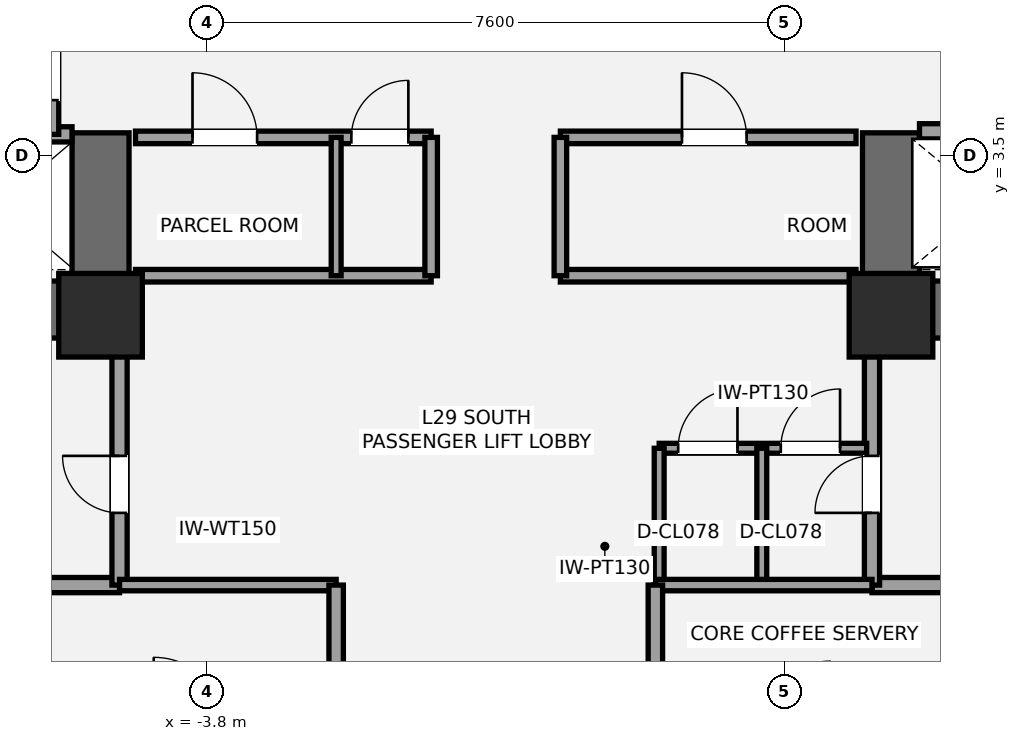
"""IFC4 building model, lengths in metres.
Left out: names, types, materials, properties, quantities, classifications, styles, units other than length and angle.
Written with IfcOpenShell. Run it as: python <this file> out.ifc"""

import sys

from ifc_helpers import new_model, si_unit, direction, frame, frame_2d, origin, origin_2d, place, context, subcontext, project, spatial, rectangle, extrude, element, fill, save


model = new_model("IFC4")
c1 = context("Model", 3, precision=1e-05, world=origin(), true_north=direction((0.0, 1.0)))
c2 = subcontext(c1, "Body", "Model", "MODEL_VIEW")
j1 = project(units=[si_unit("LENGTHUNIT", "METRE"), si_unit("PLANEANGLEUNIT", "RADIAN")], contexts=[c1])
p1 = place(None, origin())
s1 = spatial("IfcSite", under=j1, at=p1, CompositionType="ELEMENT")
p2 = place(p1, origin())
s2 = spatial("IfcBuilding", under=s1, at=p2, CompositionType="ELEMENT")
p3 = place(p2, frame((0.0, 0.0, 110.6)))
s3 = spatial("IfcBuildingStorey", under=s2, at=p3, CompositionType="ELEMENT", Elevation=110.6)
p4 = place(p3, frame((-4.825, 1.475, 0.0), z_axis=(0.0, 0.0, 1.0), x_axis=(-1.0, 0.0, 0.0)))
e1 = element("IfcWall", 1, at=p4, inside=s3, PredefinedType="SHEAR", context=c2, shape_type="SweptSolid", body=[
    extrude(rectangle(XDim=9.075, YDim=0.75, at=frame_2d((4.538, 0.0))), origin(), (0.0, 0.0, 1.0), 3.5),
])
p5 = place(p4, frame((5.475, 0.0, 0.0)))
e2 = element("IfcOpeningElement", 2, at=p5, cuts=e1, PredefinedType="OPENING", context=c2, shape_type="SweptSolid", body=[
    extrude(rectangle(XDim=1.05, YDim=2.15, at=frame_2d((0.525, 1.075))), frame((0.0, 0.385, 0.0), z_axis=(0.0, -1.0, 0.0), x_axis=(1.0, 0.0, 0.0)), (0.0, 0.0, 1.0), 0.77),
])
p6 = place(p4, frame((3.805, 0.0, 0.0)))
e3 = element("IfcOpeningElement", 3, at=p6, cuts=e1, PredefinedType="OPENING", context=c2, shape_type="SweptSolid", body=[
    extrude(rectangle(XDim=1.1, YDim=2.2, at=frame_2d((0.55, 1.1))), frame((0.0, 0.385, 0.0), z_axis=(0.0, -1.0, 0.0), x_axis=(1.0, 0.0, 0.0)), (0.0, 0.0, 1.0), 0.77),
])
p7 = place(p3, frame((-5.2, 1.1, 0.0), z_axis=(0.0, 0.0, 1.0), x_axis=(0.0, 1.0, 0.0)))
e4 = element("IfcWall", 4, at=p7, inside=s3, PredefinedType="SHEAR", context=c2, shape_type="SweptSolid", body=[
    extrude(rectangle(XDim=2.7, YDim=0.75, at=frame_2d((1.35, 0.0))), origin(), (0.0, 0.0, 1.0), 3.5),
])
p8 = place(p3, frame((13.9, 1.475, 0.0), z_axis=(0.0, 0.0, 1.0), x_axis=(-1.0, 0.0, 0.0)))
e5 = element("IfcWall", 5, at=p8, inside=s3, PredefinedType="SHEAR", context=c2, shape_type="SweptSolid", body=[
    extrude(rectangle(XDim=9.075, YDim=0.75, at=frame_2d((4.538, 0.0))), origin(), (0.0, 0.0, 1.0), 3.5),
])
p9 = place(p8, frame((2.55, 0.0, 0.0)))
e6 = element("IfcOpeningElement", 6, at=p9, cuts=e5, PredefinedType="OPENING", context=c2, shape_type="SweptSolid", body=[
    extrude(rectangle(XDim=1.05, YDim=2.15, at=frame_2d((0.525, 1.075))), frame((0.0, 0.385, 0.0), z_axis=(0.0, -1.0, 0.0), x_axis=(1.0, 0.0, 0.0)), (0.0, 0.0, 1.0), 0.77),
])
p10 = place(p8, frame((4.55, 0.0, 0.0)))
e7 = element("IfcOpeningElement", 7, at=p10, cuts=e5, PredefinedType="OPENING", context=c2, shape_type="SweptSolid", body=[
    extrude(rectangle(XDim=1.1, YDim=2.2, at=frame_2d((0.55, 1.1))), frame((0.0, 0.385, 0.0), z_axis=(0.0, -1.0, 0.0), x_axis=(1.0, 0.0, 0.0)), (0.0, 0.0, 1.0), 0.77),
])
p11 = place(p3, frame((5.2, 1.1, 0.0), z_axis=(0.0, 0.0, 1.0), x_axis=(0.0, 1.0, 0.0)))
e8 = element("IfcWall", 8, at=p11, inside=s3, PredefinedType="SHEAR", context=c2, shape_type="SweptSolid", body=[
    extrude(rectangle(XDim=2.7, YDim=0.75, at=frame_2d((1.35, 0.0))), origin(), (0.0, 0.0, 1.0), 3.5),
])
for number, where, z_axis, x_axis in (
    (9, (-5.2, 1.4, 0.0), (0.0, 0.0, 1.0), (1.0, 0.0, 0.0)),
    (10, (5.2, 1.4, 0.0), (0.0, 0.0, 1.0), (1.0, 0.0, 0.0)),
):
    element("IfcColumn", number, at=place(p3, frame(where, z_axis=z_axis, x_axis=x_axis)), inside=s3, PredefinedType="COLUMN", context=c2, shape_type="SweptSolid", body=[
        extrude(rectangle(XDim=1.1, YDim=1.1, at=origin_2d()), origin(), (0.0, 0.0, 1.0), 3.5),
    ])
p12 = place(p3, frame((-7.2, -2.15, 0.0), z_axis=(0.0, 0.0, 1.0), x_axis=(1.0, 0.0, 0.0)))
e11 = element("IfcWall", 11, at=p12, inside=s3, PredefinedType="SOLIDWALL", context=c2, shape_type="SweptSolid", body=[
    extrude(rectangle(XDim=2.25, YDim=0.2, at=frame_2d((1.125, 0.0))), origin(), (0.0, 0.0, 1.0), 2.763),
])
p13 = place(p3, frame((-4.95, -2.15, 0.0), z_axis=(0.0, 0.0, 1.0), x_axis=(0.0, 1.0, 0.0)))
e12 = element("IfcWall", 12, at=p13, inside=s3, PredefinedType="SOLIDWALL", context=c2, shape_type="SweptSolid", body=[
    extrude(rectangle(XDim=3.3, YDim=0.2, at=frame_2d((1.65, 0.0))), origin(), (0.0, 0.0, 1.0), 2.763),
])
p14 = place(p13, frame((0.95, 0.0, 0.0)))
e13 = element("IfcOpeningElement", 13, at=p14, cuts=e12, PredefinedType="OPENING", context=c2, shape_type="SweptSolid", body=[
    extrude(rectangle(XDim=0.75, YDim=2.1, at=frame_2d((0.375, 1.05))), frame((0.0, 0.11, 0.0), z_axis=(0.0, -1.0, 0.0), x_axis=(1.0, 0.0, 0.0)), (0.0, 0.0, 1.0), 0.22),
])
p15 = place(p3, frame((4.95, -2.15, 0.0), z_axis=(0.0, 0.0, 1.0), x_axis=(1.0, 0.0, 0.0)))
e14 = element("IfcWall", 14, at=p15, inside=s3, PredefinedType="SOLIDWALL", context=c2, shape_type="SweptSolid", body=[
    extrude(rectangle(XDim=2.25, YDim=0.2, at=frame_2d((1.125, 0.0))), origin(), (0.0, 0.0, 1.0), 3.31),
])
p16 = place(p3, frame((4.95, -2.15, 0.0), z_axis=(0.0, 0.0, 1.0), x_axis=(0.0, 1.0, 0.0)))
e15 = element("IfcWall", 15, at=p16, inside=s3, PredefinedType="SOLIDWALL", context=c2, shape_type="SweptSolid", body=[
    extrude(rectangle(XDim=3.3, YDim=0.2, at=frame_2d((1.65, 0.0))), origin(), (0.0, 0.0, 1.0), 3.31),
])
p17 = place(p16, frame((0.95, 0.0, 0.0)))
e16 = element("IfcOpeningElement", 16, at=p17, cuts=e15, PredefinedType="OPENING", context=c2, shape_type="SweptSolid", body=[
    extrude(rectangle(XDim=0.75, YDim=2.1, at=frame_2d((0.375, 1.05))), frame((0.0, 0.11, 0.0), z_axis=(0.0, -1.0, 0.0), x_axis=(1.0, 0.0, 0.0)), (0.0, 0.0, 1.0), 0.22),
])
p18 = place(p3, frame((2.15, -0.35, 0.0), z_axis=(0.0, 0.0, 1.0), x_axis=(1.0, 0.0, 0.0)))
e17 = element("IfcWall", 17, at=p18, inside=s3, PredefinedType="PARTITIONING", context=c2, shape_type="SweptSolid", body=[
    extrude(rectangle(XDim=2.73, YDim=0.13, at=frame_2d((1.365, 0.0))), origin(), (0.0, 0.0, 1.0), 3.31),
])
p19 = place(p18, frame((0.25, 0.0, 0.0)))
e18 = element("IfcOpeningElement", 18, at=p19, cuts=e17, PredefinedType="OPENING", context=c2, shape_type="SweptSolid", body=[
    extrude(rectangle(XDim=0.78, YDim=2.1, at=frame_2d((0.39, 1.05))), frame((0.0, 0.075, 0.0), z_axis=(0.0, -1.0, 0.0), x_axis=(1.0, 0.0, 0.0)), (0.0, 0.0, 1.0), 0.15),
])
p20 = place(p18, frame((1.6, 0.0, 0.0)))
e19 = element("IfcOpeningElement", 19, at=p20, cuts=e17, PredefinedType="OPENING", context=c2, shape_type="SweptSolid", body=[
    extrude(rectangle(XDim=0.78, YDim=2.1, at=frame_2d((0.39, 1.05))), frame((0.0, 0.075, 0.0), z_axis=(0.0, -1.0, 0.0), x_axis=(1.0, 0.0, 0.0)), (0.0, 0.0, 1.0), 0.15),
])
for number, where, z_axis, x_axis in (
    (20, (2.15, -2.15, 0.0), (0.0, 0.0, 1.0), (0.0, 1.0, 0.0)),
    (21, (3.5, -2.15, 0.0), (0.0, 0.0, 1.0), (0.0, 1.0, 0.0)),
):
    element("IfcWall", number, at=place(p3, frame(where, z_axis=z_axis, x_axis=x_axis)), inside=s3, PredefinedType="PARTITIONING", context=c2, shape_type="SweptSolid", body=[
        extrude(rectangle(XDim=1.8, YDim=0.13, at=frame_2d((0.9, 0.0))), origin(), (0.0, 0.0, 1.0), 3.31),
    ])
p21 = place(p3, frame((-9.78, 3.78, 0.0), z_axis=(0.0, 0.0, 1.0), x_axis=(1.0, 0.0, 0.0)))
e22 = element("IfcWall", 22, at=p21, inside=s3, PredefinedType="SOLIDWALL", context=c2, shape_type="SweptSolid", body=[
    extrude(rectangle(XDim=4.205, YDim=0.2, at=frame_2d((2.103, 0.0))), origin(), (0.0, 0.0, 1.0), 3.31),
])
p22 = place(p3, frame((-5.85, 3.78, 0.0), z_axis=(0.0, 0.0, 1.0), x_axis=(0.0, 1.0, 0.0)))
e23 = element("IfcWall", 23, at=p22, inside=s3, PredefinedType="SOLIDWALL", context=c2, shape_type="SweptSolid", body=[
    extrude(rectangle(XDim=1.69, YDim=0.2, at=frame_2d((0.845, 0.0))), origin(), (0.0, 0.0, 1.0), 3.31),
])
p23 = place(p22, frame((0.45, 0.0, 0.0)))
e24 = element("IfcOpeningElement", 24, at=p23, cuts=e23, PredefinedType="OPENING", context=c2, shape_type="SweptSolid", body=[
    extrude(rectangle(XDim=0.75, YDim=2.1, at=frame_2d((0.375, 1.05))), frame((0.0, 0.11, 0.0), z_axis=(0.0, -1.0, 0.0), x_axis=(1.0, 0.0, 0.0)), (0.0, 0.0, 1.0), 0.22),
])
p24 = place(p3, frame((5.575, 3.82, 0.0), z_axis=(0.0, 0.0, 1.0), x_axis=(1.0, 0.0, 0.0)))
e25 = element("IfcWall", 25, at=p24, inside=s3, PredefinedType="SOLIDWALL", context=c2, shape_type="SweptSolid", body=[
    extrude(rectangle(XDim=4.205, YDim=0.2, at=frame_2d((2.103, 0.0))), origin(), (0.0, 0.0, 1.0), 3.31),
])
p25 = place(p24, frame((0.65, 0.0, 0.0)))
e26 = element("IfcOpeningElement", 26, at=p25, cuts=e25, PredefinedType="OPENING", context=c2, shape_type="SweptSolid", body=[
    extrude(rectangle(XDim=1.2, YDim=2.2, at=frame_2d((0.6, 1.1))), frame((0.0, 0.11, 0.0), z_axis=(0.0, -1.0, 0.0), x_axis=(1.0, 0.0, 0.0)), (0.0, 0.0, 1.0), 0.22),
])
p26 = place(p3, frame((-4.74, 1.92, 0.0), z_axis=(0.0, 0.0, 1.0), x_axis=(1.0, 0.0, 0.0)))
e27 = element("IfcWall", 27, at=p26, inside=s3, PredefinedType="PARTITIONING", context=c2, shape_type="SweptSolid", body=[
    extrude(rectangle(XDim=3.89, YDim=0.165, at=frame_2d((1.945, 0.0))), origin(), (0.0, 0.0, 1.0), 2.3),
])
p27 = place(p3, frame((-4.74, 3.74, 0.0), z_axis=(0.0, 0.0, 1.0), x_axis=(1.0, 0.0, 0.0)))
e28 = element("IfcWall", 28, at=p27, inside=s3, PredefinedType="PARTITIONING", context=c2, shape_type="SweptSolid", body=[
    extrude(rectangle(XDim=3.89, YDim=0.165, at=frame_2d((1.945, 0.0))), origin(), (0.0, 0.0, 1.0), 3.31),
])
p28 = place(p27, frame((0.75, 0.0, 0.0)))
e29 = element("IfcOpeningElement", 29, at=p28, cuts=e28, PredefinedType="OPENING", context=c2, shape_type="SweptSolid", body=[
    extrude(rectangle(XDim=0.85, YDim=2.1, at=frame_2d((0.425, 1.05))), frame((0.0, 0.093, 0.0), z_axis=(0.0, -1.0, 0.0), x_axis=(1.0, 0.0, 0.0)), (0.0, 0.0, 1.0), 0.185),
])
p29 = place(p27, frame((2.84, 0.0, 0.0)))
e30 = element("IfcOpeningElement", 30, at=p29, cuts=e28, PredefinedType="OPENING", context=c2, shape_type="SweptSolid", body=[
    extrude(rectangle(XDim=0.75, YDim=2.1, at=frame_2d((0.375, 1.05))), frame((0.0, 0.093, 0.0), z_axis=(0.0, -1.0, 0.0), x_axis=(1.0, 0.0, 0.0)), (0.0, 0.0, 1.0), 0.185),
])
p30 = place(p3, frame((-0.85, 1.92, 0.0), z_axis=(0.0, 0.0, 1.0), x_axis=(0.0, 1.0, 0.0)))
e31 = element("IfcWall", 31, at=p30, inside=s3, PredefinedType="PARTITIONING", context=c2, shape_type="SweptSolid", body=[
    extrude(rectangle(XDim=1.82, YDim=0.165, at=frame_2d((0.91, 0.0))), origin(), (0.0, 0.0, 1.0), 3.31),
])
p31 = place(p3, frame((0.85, 1.92, 0.0), z_axis=(0.0, 0.0, 1.0), x_axis=(1.0, 0.0, 0.0)))
e32 = element("IfcWall", 32, at=p31, inside=s3, PredefinedType="PARTITIONING", context=c2, shape_type="SweptSolid", body=[
    extrude(rectangle(XDim=3.89, YDim=0.165, at=frame_2d((1.945, 0.0))), origin(), (0.0, 0.0, 1.0), 2.3),
])
p32 = place(p3, frame((0.85, 3.74, 0.0), z_axis=(0.0, 0.0, 1.0), x_axis=(1.0, 0.0, 0.0)))
e33 = element("IfcWall", 33, at=p32, inside=s3, PredefinedType="PARTITIONING", context=c2, shape_type="SweptSolid", body=[
    extrude(rectangle(XDim=3.89, YDim=0.165, at=frame_2d((1.945, 0.0))), origin(), (0.0, 0.0, 1.0), 3.31),
])
p33 = place(p32, frame((1.6, 0.0, 0.0)))
e34 = element("IfcOpeningElement", 34, at=p33, cuts=e33, PredefinedType="OPENING", context=c2, shape_type="SweptSolid", body=[
    extrude(rectangle(XDim=0.85, YDim=2.1, at=frame_2d((0.425, 1.05))), frame((0.0, 0.093, 0.0), z_axis=(0.0, -1.0, 0.0), x_axis=(1.0, 0.0, 0.0)), (0.0, 0.0, 1.0), 0.185),
])
p34 = place(p3, frame((0.85, 1.92, 0.0), z_axis=(0.0, 0.0, 1.0), x_axis=(0.0, 1.0, 0.0)))
e35 = element("IfcWall", 35, at=p34, inside=s3, PredefinedType="PARTITIONING", context=c2, shape_type="SweptSolid", body=[
    extrude(rectangle(XDim=1.82, YDim=0.165, at=frame_2d((0.91, 0.0))), origin(), (0.0, 0.0, 1.0), 3.31),
])
p35 = place(p3, frame((-2.1, 1.92, 0.0), z_axis=(0.0, 0.0, 1.0), x_axis=(0.0, 1.0, 0.0)))
e36 = element("IfcWall", 36, at=p35, inside=s3, PredefinedType="PARTITIONING", context=c2, shape_type="SweptSolid", body=[
    extrude(rectangle(XDim=1.82, YDim=0.13, at=frame_2d((0.91, 0.0))), origin(), (0.0, 0.0, 1.0), 3.31),
])
p36 = place(p3, frame((-4.95, -2.15, 0.0), z_axis=(0.0, 0.0, 1.0), x_axis=(1.0, 0.0, 0.0)))
e37 = element("IfcWall", 37, at=p36, inside=s3, PredefinedType="PLUMBINGWALL", context=c2, shape_type="SweptSolid", body=[
    extrude(rectangle(XDim=2.85, YDim=0.15, at=frame_2d((1.425, 0.0))), origin(), (0.0, 0.0, 1.0), 3.31),
])
p37 = place(p3, frame((-2.1, -4.05, 0.0), z_axis=(0.0, 0.0, 1.0), x_axis=(0.0, 1.0, 0.0)))
e38 = element("IfcWall", 38, at=p37, inside=s3, PredefinedType="PLUMBINGWALL", context=c2, shape_type="SweptSolid", body=[
    extrude(rectangle(XDim=1.9, YDim=0.19, at=frame_2d((0.95, 0.0))), origin(), (0.0, 0.0, 1.0), 3.31),
])
p38 = place(p3, frame((2.1, -2.15, 0.0), z_axis=(0.0, 0.0, 1.0), x_axis=(1.0, 0.0, 0.0)))
e39 = element("IfcWall", 39, at=p38, inside=s3, PredefinedType="PLUMBINGWALL", context=c2, shape_type="SweptSolid", body=[
    extrude(rectangle(XDim=2.85, YDim=0.15, at=frame_2d((1.425, 0.0))), origin(), (0.0, 0.0, 1.0), 2.763),
])
p39 = place(p3, frame((2.1, -4.05, 0.0), z_axis=(0.0, 0.0, 1.0), x_axis=(0.0, 1.0, 0.0)))
e40 = element("IfcWall", 40, at=p39, inside=s3, PredefinedType="PLUMBINGWALL", context=c2, shape_type="SweptSolid", body=[
    extrude(rectangle(XDim=1.9, YDim=0.19, at=frame_2d((0.95, 0.0))), origin(), (0.0, 0.0, 1.0), 3.31),
])
p40 = place(p14, origin())
e41 = element("IfcDoor", 41, at=p40, inside=s3, OperationType="SINGLE_SWING_RIGHT", PredefinedType="DOOR", context=c2, shape_type="SweptSolid", body=[
    extrude(rectangle(XDim=0.75, YDim=2.1, at=frame_2d((0.375, 1.05))), frame((0.0, 0.025, 0.0), z_axis=(0.0, -1.0, 0.0), x_axis=(1.0, 0.0, 0.0)), (0.0, 0.0, 1.0), 0.05),
])
fill(e13, e41)
p41 = place(p17, origin())
e42 = element("IfcDoor", 42, at=p41, inside=s3, OperationType="SINGLE_SWING_LEFT", PredefinedType="DOOR", context=c2, shape_type="SweptSolid", body=[
    extrude(rectangle(XDim=0.75, YDim=2.1, at=frame_2d((0.375, 1.05))), frame((0.0, 0.025, 0.0), z_axis=(0.0, -1.0, 0.0), x_axis=(1.0, 0.0, 0.0)), (0.0, 0.0, 1.0), 0.05),
])
fill(e16, e42)
p42 = place(p19, origin())
e43 = element("IfcDoor", 43, at=p42, inside=s3, OperationType="SINGLE_SWING_RIGHT", PredefinedType="DOOR", context=c2, shape_type="SweptSolid", body=[
    extrude(rectangle(XDim=0.78, YDim=2.1, at=frame_2d((0.39, 1.05))), frame((0.0, 0.025, 0.0), z_axis=(0.0, -1.0, 0.0), x_axis=(1.0, 0.0, 0.0)), (0.0, 0.0, 1.0), 0.05),
])
fill(e18, e43)
p43 = place(p20, origin())
e44 = element("IfcDoor", 44, at=p43, inside=s3, OperationType="SINGLE_SWING_RIGHT", PredefinedType="DOOR", context=c2, shape_type="SweptSolid", body=[
    extrude(rectangle(XDim=0.78, YDim=2.1, at=frame_2d((0.39, 1.05))), frame((0.0, 0.025, 0.0), z_axis=(0.0, -1.0, 0.0), x_axis=(1.0, 0.0, 0.0)), (0.0, 0.0, 1.0), 0.05),
])
fill(e19, e44)
p44 = place(p23, origin())
e45 = element("IfcDoor", 45, at=p44, inside=s3, OperationType="SINGLE_SWING_RIGHT", PredefinedType="DOOR", context=c2, shape_type="SweptSolid", body=[
    extrude(rectangle(XDim=0.75, YDim=2.1, at=frame_2d((0.375, 1.05))), frame((0.0, 0.025, 0.0), z_axis=(0.0, -1.0, 0.0), x_axis=(1.0, 0.0, 0.0)), (0.0, 0.0, 1.0), 0.05),
])
fill(e24, e45)
p45 = place(p28, origin())
e46 = element("IfcDoor", 46, at=p45, inside=s3, OperationType="SINGLE_SWING_LEFT", PredefinedType="DOOR", context=c2, shape_type="SweptSolid", body=[
    extrude(rectangle(XDim=0.85, YDim=2.1, at=frame_2d((0.425, 1.05))), frame((0.0, 0.025, 0.0), z_axis=(0.0, -1.0, 0.0), x_axis=(1.0, 0.0, 0.0)), (0.0, 0.0, 1.0), 0.05),
])
fill(e29, e46)
p46 = place(p29, origin())
e47 = element("IfcDoor", 47, at=p46, inside=s3, OperationType="SINGLE_SWING_RIGHT", PredefinedType="DOOR", context=c2, shape_type="SweptSolid", body=[
    extrude(rectangle(XDim=0.75, YDim=2.1, at=frame_2d((0.375, 1.05))), frame((0.0, 0.025, 0.0), z_axis=(0.0, -1.0, 0.0), x_axis=(1.0, 0.0, 0.0)), (0.0, 0.0, 1.0), 0.05),
])
fill(e30, e47)
p47 = place(p33, origin())
e48 = element("IfcDoor", 48, at=p47, inside=s3, OperationType="SINGLE_SWING_LEFT", PredefinedType="DOOR", context=c2, shape_type="SweptSolid", body=[
    extrude(rectangle(XDim=0.85, YDim=2.1, at=frame_2d((0.425, 1.05))), frame((0.0, 0.025, 0.0), z_axis=(0.0, -1.0, 0.0), x_axis=(1.0, 0.0, 0.0)), (0.0, 0.0, 1.0), 0.05),
])
fill(e34, e48)
save(model, sys.argv[1])
